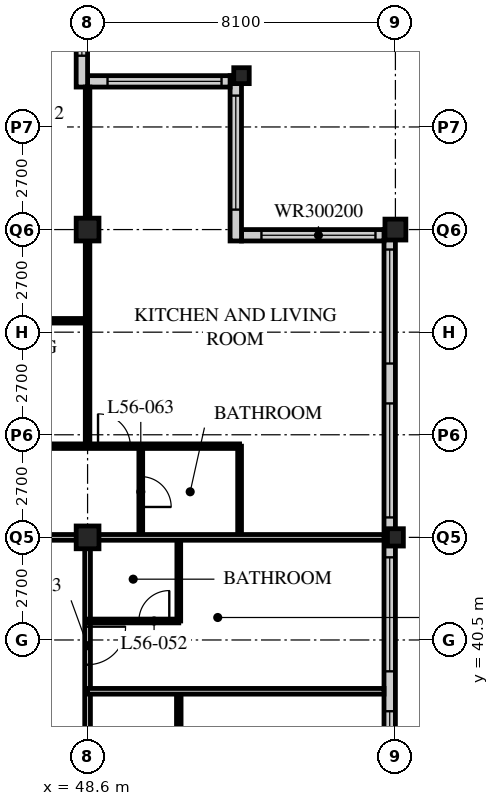
"""IFC4 building model, lengths in metres.
Left out: names, types, materials, properties, quantities, classifications, styles, units other than length and angle.
Written with IfcOpenShell. Run it as: python <this file> out.ifc"""

import sys

from ifc_helpers import new_model, si_unit, direction, frame, frame_2d, origin, origin_2d, place, context, subcontext, project, spatial, rectangle, hollow_rectangle, i_section, extrude, element, fill, save


model = new_model("IFC4")
c1 = context("Model", 3, precision=1e-05, world=origin(), true_north=direction((0.0, 1.0)))
c2 = subcontext(c1, "Body", "Model", "MODEL_VIEW")
j1 = project(units=[si_unit("LENGTHUNIT", "METRE"), si_unit("PLANEANGLEUNIT", "RADIAN")], contexts=[c1])
p1 = place(None, origin())
s1 = spatial("IfcSite", under=j1, at=p1, CompositionType="ELEMENT")
p2 = place(p1, origin())
s2 = spatial("IfcBuilding", under=s1, at=p2, CompositionType="ELEMENT")
p3 = place(p2, frame((0.0, 0.0, 217.2)))
s3 = spatial("IfcBuildingStorey", under=s2, at=p3, CompositionType="ELEMENT", Elevation=217.2)
for number, where, z_axis, x_axis in (
    (1, (48.6, 43.2, 0.0), (0.0, 0.0, 1.0), (1.0, 0.0, 0.0)),
    (2, (48.6, 51.3, 0.0), (0.0, 0.0, 1.0), (1.0, 0.0, 0.0)),
):
    element("IfcColumn", number, at=place(p3, frame(where, z_axis=z_axis, x_axis=x_axis)), inside=s3, PredefinedType="COLUMN", context=c2, shape_type="SweptSolid", body=[
        extrude(hollow_rectangle(XDim=0.6, YDim=0.6, WallThickness=0.05, at=origin_2d()), origin(), (0.0, 0.0, 1.0), 3.6),
    ])
p4 = place(p3, frame((52.65, 55.35, 0.0), z_axis=(0.0, 0.0, 1.0), x_axis=(1.0, 0.0, 0.0)))
e3 = element("IfcColumn", 3, at=p4, inside=s3, PredefinedType="COLUMN", context=c2, shape_type="SweptSolid", body=[
    extrude(i_section(OverallWidth=0.407, OverallDepth=0.419, WebThickness=0.031, FlangeThickness=0.049, FilletRadius=0.015, at=origin_2d()), origin(), (0.0, 0.0, 1.0), 3.6),
])
p5 = place(p3, frame((56.7, 43.2, 0.0), z_axis=(0.0, 0.0, 1.0), x_axis=(1.0, 0.0, 0.0)))
e4 = element("IfcColumn", 4, at=p5, inside=s3, PredefinedType="COLUMN", context=c2, shape_type="SweptSolid", body=[
    extrude(i_section(OverallWidth=0.418, OverallDepth=0.456, WebThickness=0.042, FlangeThickness=0.067, FilletRadius=0.015, at=origin_2d()), origin(), (0.0, 0.0, 1.0), 3.6),
])
p6 = place(p3, frame((56.7, 51.3, 0.0), z_axis=(0.0, 0.0, 1.0), x_axis=(1.0, 0.0, 0.0)))
e5 = element("IfcColumn", 5, at=p6, inside=s3, PredefinedType="COLUMN", context=c2, shape_type="SweptSolid", body=[
    extrude(hollow_rectangle(XDim=0.55, YDim=0.55, WallThickness=0.045, at=origin_2d()), origin(), (0.0, 0.0, 1.0), 3.6),
])
p7 = place(p3, frame((56.55, 19.2, 0.0), z_axis=(0.0, 0.0, 1.0), x_axis=(0.0, 1.0, 0.0)))
e6 = element("IfcWall", 6, at=p7, inside=s3, PredefinedType="SOLIDWALL", context=c2, shape_type="SweptSolid", body=[
    extrude(rectangle(XDim=32.1, YDim=0.3, at=frame_2d((16.05, 0.0))), origin(), (0.0, 0.0, 1.0), 3.39),
])
p8 = place(p7, frame((0.225, 0.0, 0.6)))
e7 = element("IfcOpeningElement", 7, at=p8, cuts=e6, PredefinedType="OPENING", context=c2, shape_type="SweptSolid", body=[
    extrude(rectangle(XDim=3.0, YDim=2.4, at=frame_2d((1.5, 1.2))), frame((0.0, 0.16, 0.0), z_axis=(0.0, -1.0, 0.0), x_axis=(1.0, 0.0, 0.0)), (0.0, 0.0, 1.0), 0.32),
])
p9 = place(p7, frame((4.275, 0.0, 0.6)))
e8 = element("IfcOpeningElement", 8, at=p9, cuts=e6, PredefinedType="OPENING", context=c2, shape_type="SweptSolid", body=[
    extrude(rectangle(XDim=3.0, YDim=2.4, at=frame_2d((1.5, 1.2))), frame((0.0, 0.16, 0.0), z_axis=(0.0, -1.0, 0.0), x_axis=(1.0, 0.0, 0.0)), (0.0, 0.0, 1.0), 0.32),
])
p10 = place(p7, frame((8.325, 0.0, 0.6)))
e9 = element("IfcOpeningElement", 9, at=p10, cuts=e6, PredefinedType="OPENING", context=c2, shape_type="SweptSolid", body=[
    extrude(rectangle(XDim=3.0, YDim=2.4, at=frame_2d((1.5, 1.2))), frame((0.0, 0.16, 0.0), z_axis=(0.0, -1.0, 0.0), x_axis=(1.0, 0.0, 0.0)), (0.0, 0.0, 1.0), 0.32),
])
p11 = place(p7, frame((12.375, 0.0, 0.6)))
e10 = element("IfcOpeningElement", 10, at=p11, cuts=e6, PredefinedType="OPENING", context=c2, shape_type="SweptSolid", body=[
    extrude(rectangle(XDim=3.0, YDim=2.4, at=frame_2d((1.5, 1.2))), frame((0.0, 0.16, 0.0), z_axis=(0.0, -1.0, 0.0), x_axis=(1.0, 0.0, 0.0)), (0.0, 0.0, 1.0), 0.32),
])
p12 = place(p7, frame((16.425, 0.0, 0.6)))
e11 = element("IfcOpeningElement", 11, at=p12, cuts=e6, PredefinedType="OPENING", context=c2, shape_type="SweptSolid", body=[
    extrude(rectangle(XDim=3.0, YDim=2.4, at=frame_2d((1.5, 1.2))), frame((0.0, 0.16, 0.0), z_axis=(0.0, -1.0, 0.0), x_axis=(1.0, 0.0, 0.0)), (0.0, 0.0, 1.0), 0.32),
])
p13 = place(p7, frame((20.475, 0.0, 0.6)))
e12 = element("IfcOpeningElement", 12, at=p13, cuts=e6, PredefinedType="OPENING", context=c2, shape_type="SweptSolid", body=[
    extrude(rectangle(XDim=3.0, YDim=2.4, at=frame_2d((1.5, 1.2))), frame((0.0, 0.16, 0.0), z_axis=(0.0, -1.0, 0.0), x_axis=(1.0, 0.0, 0.0)), (0.0, 0.0, 1.0), 0.32),
])
p14 = place(p7, frame((24.525, 0.0, 0.6)))
e13 = element("IfcOpeningElement", 13, at=p14, cuts=e6, PredefinedType="OPENING", context=c2, shape_type="SweptSolid", body=[
    extrude(rectangle(XDim=3.0, YDim=2.4, at=frame_2d((1.5, 1.2))), frame((0.0, 0.16, 0.0), z_axis=(0.0, -1.0, 0.0), x_axis=(1.0, 0.0, 0.0)), (0.0, 0.0, 1.0), 0.32),
])
p15 = place(p7, frame((28.575, 0.0, 0.6)))
e14 = element("IfcOpeningElement", 14, at=p15, cuts=e6, PredefinedType="OPENING", context=c2, shape_type="SweptSolid", body=[
    extrude(rectangle(XDim=3.0, YDim=2.4, at=frame_2d((1.5, 1.2))), frame((0.0, 0.16, 0.0), z_axis=(0.0, -1.0, 0.0), x_axis=(1.0, 0.0, 0.0)), (0.0, 0.0, 1.0), 0.32),
])
p16 = place(p3, frame((56.4, 51.15, 0.0), z_axis=(0.0, 0.0, 1.0), x_axis=(-1.0, 0.0, 0.0)))
e15 = element("IfcWall", 15, at=p16, inside=s3, PredefinedType="SOLIDWALL", context=c2, shape_type="SweptSolid", body=[
    extrude(rectangle(XDim=3.75, YDim=0.3, at=frame_2d((1.875, 0.0))), origin(), (0.0, 0.0, 1.0), 3.39),
])
p17 = place(p16, frame((0.225, 0.0, 0.6)))
e16 = element("IfcOpeningElement", 16, at=p17, cuts=e15, PredefinedType="OPENING", context=c2, shape_type="SweptSolid", body=[
    extrude(rectangle(XDim=3.0, YDim=2.0, at=frame_2d((1.5, 1.0))), frame((0.0, 0.16, 0.0), z_axis=(0.0, -1.0, 0.0), x_axis=(1.0, 0.0, 0.0)), (0.0, 0.0, 1.0), 0.32),
])
p18 = place(p3, frame((52.5, 51.0, 0.0), z_axis=(0.0, 0.0, 1.0), x_axis=(0.0, 1.0, 0.0)))
e17 = element("IfcWall", 17, at=p18, inside=s3, PredefinedType="SOLIDWALL", context=c2, shape_type="SweptSolid", body=[
    extrude(rectangle(XDim=4.35, YDim=0.3, at=frame_2d((2.175, 0.0))), origin(), (0.0, 0.0, 1.0), 3.39),
])
p19 = place(p18, frame((0.825, 0.0, 0.6)))
e18 = element("IfcOpeningElement", 18, at=p19, cuts=e17, PredefinedType="OPENING", context=c2, shape_type="SweptSolid", body=[
    extrude(rectangle(XDim=3.0, YDim=2.0, at=frame_2d((1.5, 1.0))), frame((0.0, 0.16, 0.0), z_axis=(0.0, -1.0, 0.0), x_axis=(1.0, 0.0, 0.0)), (0.0, 0.0, 1.0), 0.32),
])
p20 = place(p3, frame((52.35, 55.2, 0.0), z_axis=(0.0, 0.0, 1.0), x_axis=(-1.0, 0.0, 0.0)))
e19 = element("IfcWall", 19, at=p20, inside=s3, PredefinedType="SOLIDWALL", context=c2, shape_type="SweptSolid", body=[
    extrude(rectangle(XDim=3.75, YDim=0.3, at=frame_2d((1.875, 0.0))), origin(), (0.0, 0.0, 1.0), 3.39),
])
p21 = place(p20, frame((0.225, 0.0, 0.6)))
e20 = element("IfcOpeningElement", 20, at=p21, cuts=e19, PredefinedType="OPENING", context=c2, shape_type="SweptSolid", body=[
    extrude(rectangle(XDim=3.0, YDim=2.0, at=frame_2d((1.5, 1.0))), frame((0.0, 0.16, 0.0), z_axis=(0.0, -1.0, 0.0), x_axis=(1.0, 0.0, 0.0)), (0.0, 0.0, 1.0), 0.32),
])
p22 = place(p3, frame((48.45, 55.05, 0.0), z_axis=(0.0, 0.0, 1.0), x_axis=(0.0, 1.0, 0.0)))
e21 = element("IfcWall", 21, at=p22, inside=s3, PredefinedType="SOLIDWALL", context=c2, shape_type="SweptSolid", body=[
    extrude(rectangle(XDim=4.35, YDim=0.3, at=frame_2d((2.175, 0.0))), origin(), (0.0, 0.0, 1.0), 3.39),
])
p23 = place(p22, frame((0.825, 0.0, 0.6)))
e22 = element("IfcOpeningElement", 22, at=p23, cuts=e21, PredefinedType="OPENING", context=c2, shape_type="SweptSolid", body=[
    extrude(rectangle(XDim=3.0, YDim=2.0, at=frame_2d((1.5, 1.0))), frame((0.0, 0.16, 0.0), z_axis=(0.0, -1.0, 0.0), x_axis=(1.0, 0.0, 0.0)), (0.0, 0.0, 1.0), 0.32),
])
p24 = place(p3, frame((12.15, 43.2, 0.0), z_axis=(0.0, 0.0, 1.0), x_axis=(1.0, 0.0, 0.0)))
e23 = element("IfcWall", 23, at=p24, inside=s3, PredefinedType="PARTITIONING", context=c2, shape_type="SweptSolid", body=[
    extrude(rectangle(XDim=36.45, YDim=0.15, at=frame_2d((18.225, 0.0))), origin(), (0.0, 0.0, 1.0), 2.778),
])
p25 = place(p24, frame((4.95, 0.0, 0.0)))
e24 = element("IfcOpeningElement", 24, at=p25, cuts=e23, PredefinedType="OPENING", context=c2, shape_type="SweptSolid", body=[
    extrude(rectangle(XDim=1.0, YDim=2.1, at=frame_2d((0.5, 1.05))), frame((0.0, 0.085, 0.0), z_axis=(0.0, -1.0, 0.0), x_axis=(1.0, 0.0, 0.0)), (0.0, 0.0, 1.0), 0.17),
])
p26 = place(p24, frame((25.0, 0.0, 0.0)))
e25 = element("IfcOpeningElement", 25, at=p26, cuts=e23, PredefinedType="OPENING", context=c2, shape_type="SweptSolid", body=[
    extrude(rectangle(XDim=1.0, YDim=2.1, at=frame_2d((0.5, 1.05))), frame((0.0, 0.085, 0.0), z_axis=(0.0, -1.0, 0.0), x_axis=(1.0, 0.0, 0.0)), (0.0, 0.0, 1.0), 0.17),
])
p27 = place(p24, frame((30.7, 0.0, 0.0)))
e26 = element("IfcOpeningElement", 26, at=p27, cuts=e23, PredefinedType="OPENING", context=c2, shape_type="SweptSolid", body=[
    extrude(rectangle(XDim=1.0, YDim=2.1, at=frame_2d((0.5, 1.05))), frame((0.0, 0.085, 0.0), z_axis=(0.0, -1.0, 0.0), x_axis=(1.0, 0.0, 0.0)), (0.0, 0.0, 1.0), 0.17),
])
p28 = place(p24, frame((33.925, 0.0, 0.0)))
e27 = element("IfcOpeningElement", 27, at=p28, cuts=e23, PredefinedType="OPENING", context=c2, shape_type="SweptSolid", body=[
    extrude(rectangle(XDim=1.0, YDim=2.1, at=frame_2d((0.5, 1.05))), frame((0.0, 0.085, 0.0), z_axis=(0.0, -1.0, 0.0), x_axis=(1.0, 0.0, 0.0)), (0.0, 0.0, 1.0), 0.17),
])
p29 = place(p24, frame((1.525, 0.0, 0.0)))
e28 = element("IfcOpeningElement", 28, at=p29, cuts=e23, PredefinedType="OPENING", context=c2, shape_type="SweptSolid", body=[
    extrude(rectangle(XDim=1.0, YDim=2.1, at=frame_2d((0.5, 1.05))), frame((0.0, 0.085, 0.0), z_axis=(0.0, -1.0, 0.0), x_axis=(1.0, 0.0, 0.0)), (0.0, 0.0, 1.0), 0.17),
])
p30 = place(p3, frame((48.6, 18.9, 0.0), z_axis=(0.0, 0.0, 1.0), x_axis=(0.0, 1.0, 0.0)))
e29 = element("IfcWall", 29, at=p30, inside=s3, PredefinedType="PARTITIONING", context=c2, shape_type="SweptSolid", body=[
    extrude(rectangle(XDim=24.3, YDim=0.15, at=frame_2d((12.15, 0.0))), origin(), (0.0, 0.0, 1.0), 2.778),
])
p31 = place(p30, frame((0.9, 0.0, 0.0)))
e30 = element("IfcOpeningElement", 30, at=p31, cuts=e29, PredefinedType="OPENING", context=c2, shape_type="SweptSolid", body=[
    extrude(rectangle(XDim=1.0, YDim=2.1, at=frame_2d((0.5, 1.05))), frame((0.0, 0.085, 0.0), z_axis=(0.0, -1.0, 0.0), x_axis=(1.0, 0.0, 0.0)), (0.0, 0.0, 1.0), 0.17),
])
p32 = place(p30, frame((20.95, 0.0, 0.0)))
e31 = element("IfcOpeningElement", 31, at=p32, cuts=e29, PredefinedType="OPENING", context=c2, shape_type="SweptSolid", body=[
    extrude(rectangle(XDim=1.0, YDim=2.1, at=frame_2d((0.5, 1.05))), frame((0.0, 0.085, 0.0), z_axis=(0.0, -1.0, 0.0), x_axis=(1.0, 0.0, 0.0)), (0.0, 0.0, 1.0), 0.17),
])
p33 = place(p3, frame((51.0, 18.9, 0.0), z_axis=(0.0, 0.0, 1.0), x_axis=(0.0, 1.0, 0.0)))
e32 = element("IfcWall", 32, at=p33, inside=s3, PredefinedType="PARTITIONING", context=c2, shape_type="SweptSolid", body=[
    extrude(rectangle(XDim=20.25, YDim=0.12, at=frame_2d((10.125, 0.0))), origin(), (0.0, 0.0, 1.0), 3.39),
])
p34 = place(p33, frame((0.975, 0.0, 0.0)))
e33 = element("IfcOpeningElement", 33, at=p34, cuts=e32, PredefinedType="OPENING", context=c2, shape_type="SweptSolid", body=[
    extrude(rectangle(XDim=0.85, YDim=2.1, at=frame_2d((0.425, 1.05))), frame((0.0, 0.07, 0.0), z_axis=(0.0, -1.0, 0.0), x_axis=(1.0, 0.0, 0.0)), (0.0, 0.0, 1.0), 0.14),
])
p35 = place(p33, frame((8.425, 0.0, 0.0)))
e34 = element("IfcOpeningElement", 34, at=p35, cuts=e32, PredefinedType="OPENING", context=c2, shape_type="SweptSolid", body=[
    extrude(rectangle(XDim=0.85, YDim=2.1, at=frame_2d((0.425, 1.05))), frame((0.0, 0.07, 0.0), z_axis=(0.0, -1.0, 0.0), x_axis=(1.0, 0.0, 0.0)), (0.0, 0.0, 1.0), 0.14),
])
p36 = place(p33, frame((12.475, 0.0, 0.0)))
e35 = element("IfcOpeningElement", 35, at=p36, cuts=e32, PredefinedType="OPENING", context=c2, shape_type="SweptSolid", body=[
    extrude(rectangle(XDim=0.85, YDim=2.1, at=frame_2d((0.425, 1.05))), frame((0.0, 0.07, 0.0), z_axis=(0.0, -1.0, 0.0), x_axis=(1.0, 0.0, 0.0)), (0.0, 0.0, 1.0), 0.14),
])
p37 = place(p33, frame((16.525, 0.0, 0.0)))
e36 = element("IfcOpeningElement", 36, at=p37, cuts=e32, PredefinedType="OPENING", context=c2, shape_type="SweptSolid", body=[
    extrude(rectangle(XDim=0.85, YDim=2.1, at=frame_2d((0.425, 1.05))), frame((0.0, 0.07, 0.0), z_axis=(0.0, -1.0, 0.0), x_axis=(1.0, 0.0, 0.0)), (0.0, 0.0, 1.0), 0.14),
])
p38 = place(p3, frame((48.6, 39.15, 0.0), z_axis=(0.0, 0.0, 1.0), x_axis=(1.0, 0.0, 0.0)))
e37 = element("IfcWall", 37, at=p38, inside=s3, PredefinedType="PARTITIONING", context=c2, shape_type="SweptSolid", body=[
    extrude(rectangle(XDim=7.8, YDim=0.15, at=frame_2d((3.9, 0.0))), origin(), (0.0, 0.0, 1.0), 3.39),
])
p39 = place(p3, frame((51.0, 41.0, 0.0), z_axis=(0.0, 0.0, 1.0), x_axis=(0.0, 1.0, 0.0)))
e38 = element("IfcWall", 38, at=p39, inside=s3, PredefinedType="PARTITIONING", context=c2, shape_type="SweptSolid", body=[
    extrude(rectangle(XDim=2.2, YDim=0.1, at=frame_2d((1.1, 0.0))), origin(), (0.0, 0.0, 1.0), 3.39),
])
p40 = place(p3, frame((48.6, 41.0, 0.0), z_axis=(0.0, 0.0, 1.0), x_axis=(1.0, 0.0, 0.0)))
e39 = element("IfcWall", 39, at=p40, inside=s3, PredefinedType="PARTITIONING", context=c2, shape_type="SweptSolid", body=[
    extrude(rectangle(XDim=2.4, YDim=0.1, at=frame_2d((1.2, 0.0))), origin(), (0.0, 0.0, 1.0), 3.39),
])
p41 = place(p40, frame((1.35, 0.0, 0.0)))
e40 = element("IfcOpeningElement", 40, at=p41, cuts=e39, PredefinedType="OPENING", context=c2, shape_type="SweptSolid", body=[
    extrude(rectangle(XDim=0.8, YDim=2.1, at=frame_2d((0.4, 1.05))), frame((0.0, 0.06, 0.0), z_axis=(0.0, -1.0, 0.0), x_axis=(1.0, 0.0, 0.0)), (0.0, 0.0, 1.0), 0.12),
])
p42 = place(p3, frame((44.55, 45.6, 0.0), z_axis=(0.0, 0.0, 1.0), x_axis=(1.0, 0.0, 0.0)))
e41 = element("IfcWall", 41, at=p42, inside=s3, PredefinedType="PARTITIONING", context=c2, shape_type="SweptSolid", body=[
    extrude(rectangle(XDim=8.05, YDim=0.12, at=frame_2d((4.025, 0.0))), origin(), (0.0, 0.0, 1.0), 3.39),
])
p43 = place(p42, frame((0.475, 0.0, 0.0)))
e42 = element("IfcOpeningElement", 42, at=p43, cuts=e41, PredefinedType="OPENING", context=c2, shape_type="SweptSolid", body=[
    extrude(rectangle(XDim=0.85, YDim=2.1, at=frame_2d((0.425, 1.05))), frame((0.0, 0.07, 0.0), z_axis=(0.0, -1.0, 0.0), x_axis=(1.0, 0.0, 0.0)), (0.0, 0.0, 1.0), 0.14),
])
p44 = place(p42, frame((4.325, 0.0, 0.0)))
e43 = element("IfcOpeningElement", 43, at=p44, cuts=e41, PredefinedType="OPENING", context=c2, shape_type="SweptSolid", body=[
    extrude(rectangle(XDim=0.85, YDim=2.1, at=frame_2d((0.425, 1.05))), frame((0.0, 0.07, 0.0), z_axis=(0.0, -1.0, 0.0), x_axis=(1.0, 0.0, 0.0)), (0.0, 0.0, 1.0), 0.14),
])
p45 = place(p3, frame((50.0, 43.2, 0.0), z_axis=(0.0, 0.0, 1.0), x_axis=(0.0, 1.0, 0.0)))
e44 = element("IfcWall", 44, at=p45, inside=s3, PredefinedType="PARTITIONING", context=c2, shape_type="SweptSolid", body=[
    extrude(rectangle(XDim=2.4, YDim=0.1, at=frame_2d((1.2, 0.0))), origin(), (0.0, 0.0, 1.0), 3.39),
])
p46 = place(p45, frame((0.8, 0.0, 0.0)))
e45 = element("IfcOpeningElement", 45, at=p46, cuts=e44, PredefinedType="OPENING", context=c2, shape_type="SweptSolid", body=[
    extrude(rectangle(XDim=0.8, YDim=2.1, at=frame_2d((0.4, 1.05))), frame((0.0, 0.06, 0.0), z_axis=(0.0, -1.0, 0.0), x_axis=(1.0, 0.0, 0.0)), (0.0, 0.0, 1.0), 0.12),
])
p47 = place(p3, frame((52.6, 43.2, 0.0), z_axis=(0.0, 0.0, 1.0), x_axis=(0.0, 1.0, 0.0)))
e46 = element("IfcWall", 46, at=p47, inside=s3, PredefinedType="PARTITIONING", context=c2, shape_type="SweptSolid", body=[
    extrude(rectangle(XDim=2.4, YDim=0.1, at=frame_2d((1.2, 0.0))), origin(), (0.0, 0.0, 1.0), 3.39),
])
p48 = place(p3, frame((48.6, 45.6, 0.0), z_axis=(0.0, 0.0, 1.0), x_axis=(0.0, 1.0, 0.0)))
e47 = element("IfcWall", 47, at=p48, inside=s3, PredefinedType="PARTITIONING", context=c2, shape_type="SweptSolid", body=[
    extrude(rectangle(XDim=9.45, YDim=0.12, at=frame_2d((4.725, 0.0))), origin(), (0.0, 0.0, 1.0), 2.778),
])
p49 = place(p3, frame((48.6, 43.2, 0.0), z_axis=(0.0, 0.0, 1.0), x_axis=(1.0, 0.0, 0.0)))
e48 = element("IfcWall", 48, at=p49, inside=s3, PredefinedType="PARTITIONING", context=c2, shape_type="SweptSolid", body=[
    extrude(rectangle(XDim=7.8, YDim=0.15, at=frame_2d((3.9, 0.0))), origin(), (0.0, 0.0, 1.0), 2.778),
])
p50 = place(p3, frame((44.55, 48.9, 0.0), z_axis=(0.0, 0.0, 1.0), x_axis=(1.0, 0.0, 0.0)))
e49 = element("IfcWall", 49, at=p50, inside=s3, PredefinedType="PARTITIONING", context=c2, shape_type="SweptSolid", body=[
    extrude(rectangle(XDim=4.05, YDim=0.12, at=frame_2d((2.025, 0.0))), origin(), (0.0, 0.0, 1.0), 3.39),
])
p51 = place(p50, frame((1.6, 0.0, 0.0)))
e50 = element("IfcOpeningElement", 50, at=p51, cuts=e49, PredefinedType="OPENING", context=c2, shape_type="SweptSolid", body=[
    extrude(rectangle(XDim=0.85, YDim=2.1, at=frame_2d((0.425, 1.05))), frame((0.0, 0.07, 0.0), z_axis=(0.0, -1.0, 0.0), x_axis=(1.0, 0.0, 0.0)), (0.0, 0.0, 1.0), 0.14),
])
p52 = place(p12, origin())
e51 = element("IfcWindow", 51, at=p52, inside=s3, PartitioningType="SINGLE_PANEL", PredefinedType="WINDOW", context=c2, shape_type="SweptSolid", body=[
    extrude(rectangle(XDim=3.0, YDim=2.4, at=frame_2d((1.5, 1.2))), frame((0.0, 0.03, 0.0), z_axis=(0.0, -1.0, 0.0), x_axis=(1.0, 0.0, 0.0)), (0.0, 0.0, 1.0), 0.06),
])
fill(e11, e51)
p53 = place(p13, origin())
e52 = element("IfcWindow", 52, at=p53, inside=s3, PartitioningType="SINGLE_PANEL", PredefinedType="WINDOW", context=c2, shape_type="SweptSolid", body=[
    extrude(rectangle(XDim=3.0, YDim=2.4, at=frame_2d((1.5, 1.2))), frame((0.0, 0.03, 0.0), z_axis=(0.0, -1.0, 0.0), x_axis=(1.0, 0.0, 0.0)), (0.0, 0.0, 1.0), 0.06),
])
fill(e12, e52)
p54 = place(p14, origin())
e53 = element("IfcWindow", 53, at=p54, inside=s3, PartitioningType="SINGLE_PANEL", PredefinedType="WINDOW", context=c2, shape_type="SweptSolid", body=[
    extrude(rectangle(XDim=3.0, YDim=2.4, at=frame_2d((1.5, 1.2))), frame((0.0, 0.03, 0.0), z_axis=(0.0, -1.0, 0.0), x_axis=(1.0, 0.0, 0.0)), (0.0, 0.0, 1.0), 0.06),
])
fill(e13, e53)
p55 = place(p15, origin())
e54 = element("IfcWindow", 54, at=p55, inside=s3, PartitioningType="SINGLE_PANEL", PredefinedType="WINDOW", context=c2, shape_type="SweptSolid", body=[
    extrude(rectangle(XDim=3.0, YDim=2.4, at=frame_2d((1.5, 1.2))), frame((0.0, 0.03, 0.0), z_axis=(0.0, -1.0, 0.0), x_axis=(1.0, 0.0, 0.0)), (0.0, 0.0, 1.0), 0.06),
])
fill(e14, e54)
p56 = place(p17, origin())
e55 = element("IfcWindow", 55, at=p56, inside=s3, PartitioningType="SINGLE_PANEL", PredefinedType="WINDOW", context=c2, shape_type="SweptSolid", body=[
    extrude(rectangle(XDim=3.0, YDim=2.0, at=frame_2d((1.5, 1.0))), frame((0.0, 0.03, 0.0), z_axis=(0.0, -1.0, 0.0), x_axis=(1.0, 0.0, 0.0)), (0.0, 0.0, 1.0), 0.06),
])
fill(e16, e55)
p57 = place(p19, origin())
e56 = element("IfcWindow", 56, at=p57, inside=s3, PartitioningType="SINGLE_PANEL", PredefinedType="WINDOW", context=c2, shape_type="SweptSolid", body=[
    extrude(rectangle(XDim=3.0, YDim=2.0, at=frame_2d((1.5, 1.0))), frame((0.0, 0.03, 0.0), z_axis=(0.0, -1.0, 0.0), x_axis=(1.0, 0.0, 0.0)), (0.0, 0.0, 1.0), 0.06),
])
fill(e18, e56)
p58 = place(p21, origin())
e57 = element("IfcWindow", 57, at=p58, inside=s3, PartitioningType="SINGLE_PANEL", PredefinedType="WINDOW", context=c2, shape_type="SweptSolid", body=[
    extrude(rectangle(XDim=3.0, YDim=2.0, at=frame_2d((1.5, 1.0))), frame((0.0, 0.03, 0.0), z_axis=(0.0, -1.0, 0.0), x_axis=(1.0, 0.0, 0.0)), (0.0, 0.0, 1.0), 0.06),
])
fill(e20, e57)
p59 = place(p23, origin())
e58 = element("IfcWindow", 58, at=p59, inside=s3, PartitioningType="SINGLE_PANEL", PredefinedType="WINDOW", context=c2, shape_type="SweptSolid", body=[
    extrude(rectangle(XDim=3.0, YDim=2.0, at=frame_2d((1.5, 1.0))), frame((0.0, 0.03, 0.0), z_axis=(0.0, -1.0, 0.0), x_axis=(1.0, 0.0, 0.0)), (0.0, 0.0, 1.0), 0.06),
])
fill(e22, e58)
p60 = place(p41, origin())
e59 = element("IfcDoor", 59, at=p60, inside=s3, OperationType="SINGLE_SWING_RIGHT", PredefinedType="DOOR", context=c2, shape_type="SweptSolid", body=[
    extrude(rectangle(XDim=0.8, YDim=2.1, at=frame_2d((0.4, 1.05))), frame((0.0, 0.025, 0.0), z_axis=(0.0, -1.0, 0.0), x_axis=(1.0, 0.0, 0.0)), (0.0, 0.0, 1.0), 0.05),
])
fill(e40, e59)
p61 = place(p32, origin())
e60 = element("IfcDoor", 60, at=p61, inside=s3, OperationType="SINGLE_SWING_LEFT", PredefinedType="DOOR", context=c2, shape_type="SweptSolid", body=[
    extrude(rectangle(XDim=1.0, YDim=2.1, at=frame_2d((0.5, 1.05))), frame((0.0, 0.025, 0.0), z_axis=(0.0, -1.0, 0.0), x_axis=(1.0, 0.0, 0.0)), (0.0, 0.0, 1.0), 0.05),
])
fill(e31, e60)
p62 = place(p46, origin())
e61 = element("IfcDoor", 61, at=p62, inside=s3, OperationType="SINGLE_SWING_RIGHT", PredefinedType="DOOR", context=c2, shape_type="SweptSolid", body=[
    extrude(rectangle(XDim=0.8, YDim=2.1, at=frame_2d((0.4, 1.05))), frame((0.0, 0.025, 0.0), z_axis=(0.0, -1.0, 0.0), x_axis=(1.0, 0.0, 0.0)), (0.0, 0.0, 1.0), 0.05),
])
fill(e45, e61)
p63 = place(p44, origin())
e62 = element("IfcDoor", 62, at=p63, inside=s3, OperationType="SINGLE_SWING_LEFT", PredefinedType="DOOR", context=c2, shape_type="SweptSolid", body=[
    extrude(rectangle(XDim=0.85, YDim=2.1, at=frame_2d((0.425, 1.05))), frame((0.0, 0.025, 0.0), z_axis=(0.0, -1.0, 0.0), x_axis=(1.0, 0.0, 0.0)), (0.0, 0.0, 1.0), 0.05),
])
fill(e43, e62)
save(model, sys.argv[1])
